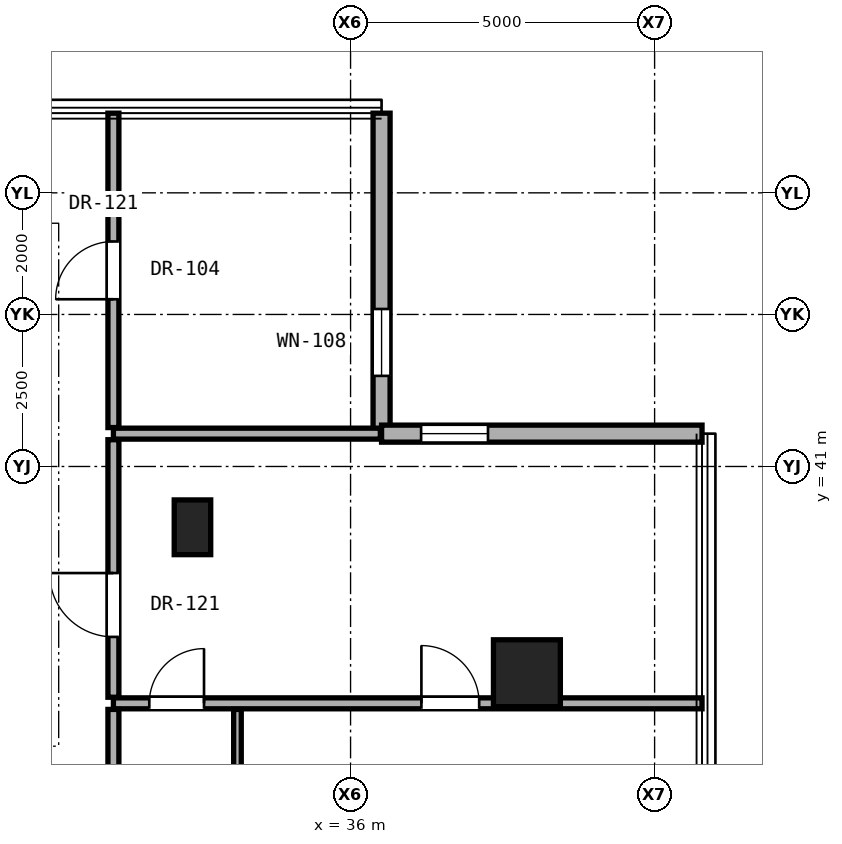
"""IFC4 building model, lengths in metres.
Left out: names, types, materials, properties, quantities, classifications, styles, units other than length and angle.
Written with IfcOpenShell. Run it as: python <this file> out.ifc"""

import sys

from ifc_helpers import new_model, si_unit, direction, frame, frame_2d, origin, origin_2d, place, context, subcontext, project, spatial, rectangle, hollow_rectangle, extrude, element, fill, save


model = new_model("IFC4")
c1 = context("Model", 3, precision=1e-05, world=origin(), true_north=direction((0.0, 1.0)))
c2 = subcontext(c1, "Body", "Model", "MODEL_VIEW")
j1 = project(units=[si_unit("LENGTHUNIT", "METRE"), si_unit("PLANEANGLEUNIT", "RADIAN")], contexts=[c1])
p1 = place(None, origin())
s1 = spatial("IfcSite", under=j1, at=p1, CompositionType="ELEMENT")
p2 = place(p1, origin())
s2 = spatial("IfcBuilding", under=s1, at=p2, CompositionType="ELEMENT")
p3 = place(p2, frame((0.0, 0.0, 134.6)))
s3 = spatial("IfcBuildingStorey", under=s2, at=p3, CompositionType="ELEMENT", Elevation=134.6)
p4 = place(p3, frame((38.9, 37.6, 0.0), z_axis=(0.0, 0.0, 1.0), x_axis=(1.0, 0.0, 0.0)))
e1 = element("IfcColumn", 1, at=p4, inside=s3, PredefinedType="COLUMN", context=c2, shape_type="SweptSolid", body=[
    extrude(hollow_rectangle(XDim=1.1, YDim=1.1, WallThickness=0.06, at=origin_2d()), origin(), (0.0, 0.0, 1.0), 3.3),
])
p5 = place(p3, frame((33.4, 40.0, 0.0), z_axis=(0.0, 0.0, 1.0), x_axis=(1.0, 0.0, 0.0)))
e2 = element("IfcColumn", 2, at=p5, inside=s3, PredefinedType="PILASTER", context=c2, shape_type="SweptSolid", body=[
    extrude(rectangle(XDim=0.6, YDim=0.9, at=origin_2d()), origin(), (0.0, 0.0, 1.0), 3.3),
])
p6 = place(p3, frame((36.51, 41.54, 0.0), z_axis=(0.0, 0.0, 1.0), x_axis=(0.0, 1.0, 0.0)))
e3 = element("IfcWall", 3, at=p6, inside=s3, PredefinedType="SOLIDWALL", context=c2, shape_type="SweptSolid", body=[
    extrude(rectangle(XDim=5.27, YDim=0.28, at=frame_2d((2.635, 0.0))), origin(), (0.0, 0.0, 1.0), 3.06),
])
p7 = place(p6, frame((0.95, 0.0, 0.85)))
e4 = element("IfcOpeningElement", 4, at=p7, cuts=e3, PredefinedType="OPENING", context=c2, shape_type="SweptSolid", body=[
    extrude(rectangle(XDim=1.1, YDim=2.0, at=frame_2d((0.55, 1.0))), frame((0.0, 0.15, 0.0), z_axis=(0.0, -1.0, 0.0), x_axis=(1.0, 0.0, 0.0)), (0.0, 0.0, 1.0), 0.3),
])
p8 = place(p3, frame((41.78, 41.54, 0.0), z_axis=(0.0, 0.0, 1.0), x_axis=(-1.0, 0.0, 0.0)))
e5 = element("IfcWall", 5, at=p8, inside=s3, PredefinedType="SOLIDWALL", context=c2, shape_type="SweptSolid", body=[
    extrude(rectangle(XDim=5.27, YDim=0.28, at=frame_2d((2.635, 0.0))), origin(), (0.0, 0.0, 1.0), 3.06),
])
p9 = place(p8, frame((3.52, 0.0, 0.85)))
e6 = element("IfcOpeningElement", 6, at=p9, cuts=e5, PredefinedType="OPENING", context=c2, shape_type="SweptSolid", body=[
    extrude(rectangle(XDim=1.1, YDim=2.0, at=frame_2d((0.55, 1.0))), frame((0.0, 0.15, 0.0), z_axis=(0.0, -1.0, 0.0), x_axis=(1.0, 0.0, 0.0)), (0.0, 0.0, 1.0), 0.3),
])
p10 = place(p3, frame((32.1, 37.105, 0.0), z_axis=(0.0, 0.0, 1.0), x_axis=(1.0, 0.0, 0.0)))
e7 = element("IfcWall", 7, at=p10, inside=s3, PredefinedType="PARTITIONING", context=c2, shape_type="SweptSolid", body=[
    extrude(rectangle(XDim=9.68, YDim=0.18, at=frame_2d((4.84, 0.0))), origin(), (0.0, 0.0, 1.0), 2.299),
])
p11 = place(p10, frame((5.065, 0.0, 0.0)))
e8 = element("IfcOpeningElement", 8, at=p11, cuts=e7, PredefinedType="OPENING", context=c2, shape_type="SweptSolid", body=[
    extrude(rectangle(XDim=0.95, YDim=2.15, at=frame_2d((0.475, 1.075))), frame((0.0, 0.1, 0.0), z_axis=(0.0, -1.0, 0.0), x_axis=(1.0, 0.0, 0.0)), (0.0, 0.0, 1.0), 0.2),
])
p12 = place(p10, frame((0.59, 0.0, 0.0)))
e9 = element("IfcOpeningElement", 9, at=p12, cuts=e7, PredefinedType="OPENING", context=c2, shape_type="SweptSolid", body=[
    extrude(rectangle(XDim=0.9, YDim=2.1, at=frame_2d((0.45, 1.05))), frame((0.0, 0.1, 0.0), z_axis=(0.0, -1.0, 0.0), x_axis=(1.0, 0.0, 0.0)), (0.0, 0.0, 1.0), 0.2),
])
p13 = place(p3, frame((32.1, 41.54, 0.0), z_axis=(0.0, 0.0, 1.0), x_axis=(1.0, 0.0, 0.0)))
e10 = element("IfcWall", 10, at=p13, inside=s3, PredefinedType="PARTITIONING", context=c2, shape_type="SweptSolid", body=[
    extrude(rectangle(XDim=4.39, YDim=0.18, at=frame_2d((2.195, 0.0))), origin(), (0.0, 0.0, 1.0), 3.08),
])
p14 = place(p3, frame((32.1, 34.458, 0.0), z_axis=(0.0, 0.0, 1.0), x_axis=(0.0, 1.0, 0.0)))
e11 = element("IfcWall", 11, at=p14, inside=s3, PredefinedType="PARTITIONING", context=c2, shape_type="SweptSolid", body=[
    extrude(rectangle(XDim=2.547, YDim=0.18, at=frame_2d((1.274, 0.0))), origin(), (0.0, 0.0, 1.0), 3.08),
])
p15 = place(p3, frame((32.1, 37.205, 0.0), z_axis=(0.0, 0.0, 1.0), x_axis=(0.0, 1.0, 0.0)))
e12 = element("IfcWall", 12, at=p15, inside=s3, PredefinedType="PARTITIONING", context=c2, shape_type="SweptSolid", body=[
    extrude(rectangle(XDim=4.235, YDim=0.18, at=frame_2d((2.117, 0.0))), origin(), (0.0, 0.0, 1.0), 2.456),
])
p16 = place(p15, frame((0.992, 0.0, 0.0)))
e13 = element("IfcOpeningElement", 13, at=p16, cuts=e12, PredefinedType="OPENING", context=c2, shape_type="SweptSolid", body=[
    extrude(rectangle(XDim=1.05, YDim=2.2, at=frame_2d((0.525, 1.1))), frame((0.0, 0.1, 0.0), z_axis=(0.0, -1.0, 0.0), x_axis=(1.0, 0.0, 0.0)), (0.0, 0.0, 1.0), 0.2),
])
p17 = place(p3, frame((32.1, 41.64, 0.0), z_axis=(0.0, 0.0, 1.0), x_axis=(0.0, 1.0, 0.0)))
e14 = element("IfcWall", 14, at=p17, inside=s3, PredefinedType="PARTITIONING", context=c2, shape_type="SweptSolid", body=[
    extrude(rectangle(XDim=5.17, YDim=0.18, at=frame_2d((2.585, 0.0))), origin(), (0.0, 0.0, 1.0), 3.08),
])
p18 = place(p17, frame((2.11, 0.0, 0.0)))
e15 = element("IfcOpeningElement", 15, at=p18, cuts=e14, PredefinedType="OPENING", context=c2, shape_type="SweptSolid", body=[
    extrude(rectangle(XDim=0.95, YDim=2.15, at=frame_2d((0.475, 1.075))), frame((0.0, 0.1, 0.0), z_axis=(0.0, -1.0, 0.0), x_axis=(1.0, 0.0, 0.0)), (0.0, 0.0, 1.0), 0.2),
])
p19 = place(p3, frame((34.14, 34.458, 0.0), z_axis=(0.0, 0.0, 1.0), x_axis=(0.0, 1.0, 0.0)))
e16 = element("IfcWall", 16, at=p19, inside=s3, PredefinedType="PARTITIONING", context=c2, shape_type="SweptSolid", body=[
    extrude(rectangle(XDim=2.547, YDim=0.125, at=frame_2d((1.274, 0.0))), origin(), (0.0, 0.0, 1.0), 3.08),
])
p20 = place(p7, origin())
e17 = element("IfcWindow", 17, at=p20, inside=s3, PartitioningType="SINGLE_PANEL", PredefinedType="WINDOW", context=c2, shape_type="SweptSolid", body=[
    extrude(rectangle(XDim=1.1, YDim=2.0, at=frame_2d((0.55, 1.0))), frame((0.0, 0.03, 0.0), z_axis=(0.0, -1.0, 0.0), x_axis=(1.0, 0.0, 0.0)), (0.0, 0.0, 1.0), 0.06),
])
fill(e4, e17)
p21 = place(p9, origin())
e18 = element("IfcWindow", 18, at=p21, inside=s3, PartitioningType="SINGLE_PANEL", PredefinedType="WINDOW", context=c2, shape_type="SweptSolid", body=[
    extrude(rectangle(XDim=1.1, YDim=2.0, at=frame_2d((0.55, 1.0))), frame((0.0, 0.03, 0.0), z_axis=(0.0, -1.0, 0.0), x_axis=(1.0, 0.0, 0.0)), (0.0, 0.0, 1.0), 0.06),
])
fill(e6, e18)
p22 = place(p16, origin())
e19 = element("IfcDoor", 19, at=p22, inside=s3, OperationType="SINGLE_SWING_RIGHT", PredefinedType="DOOR", context=c2, shape_type="SweptSolid", body=[
    extrude(rectangle(XDim=1.05, YDim=2.2, at=frame_2d((0.525, 1.1))), frame((0.0, 0.025, 0.0), z_axis=(0.0, -1.0, 0.0), x_axis=(1.0, 0.0, 0.0)), (0.0, 0.0, 1.0), 0.05),
])
fill(e13, e19)
p23 = place(p11, origin())
e20 = element("IfcDoor", 20, at=p23, inside=s3, OperationType="SINGLE_SWING_LEFT", PredefinedType="DOOR", context=c2, shape_type="SweptSolid", body=[
    extrude(rectangle(XDim=0.95, YDim=2.15, at=frame_2d((0.475, 1.075))), frame((0.0, 0.025, 0.0), z_axis=(0.0, -1.0, 0.0), x_axis=(1.0, 0.0, 0.0)), (0.0, 0.0, 1.0), 0.05),
])
fill(e8, e20)
p24 = place(p12, origin())
e21 = element("IfcDoor", 21, at=p24, inside=s3, OperationType="SINGLE_SWING_RIGHT", PredefinedType="DOOR", context=c2, shape_type="SweptSolid", body=[
    extrude(rectangle(XDim=0.9, YDim=2.1, at=frame_2d((0.45, 1.05))), frame((0.0, 0.025, 0.0), z_axis=(0.0, -1.0, 0.0), x_axis=(1.0, 0.0, 0.0)), (0.0, 0.0, 1.0), 0.05),
])
fill(e9, e21)
p25 = place(p18, origin())
e22 = element("IfcDoor", 22, at=p25, inside=s3, OperationType="SINGLE_SWING_LEFT", PredefinedType="DOOR", context=c2, shape_type="SweptSolid", body=[
    extrude(rectangle(XDim=0.95, YDim=2.15, at=frame_2d((0.475, 1.075))), frame((0.0, 0.025, 0.0), z_axis=(0.0, -1.0, 0.0), x_axis=(1.0, 0.0, 0.0)), (0.0, 0.0, 1.0), 0.05),
])
fill(e15, e22)
save(model, sys.argv[1])
